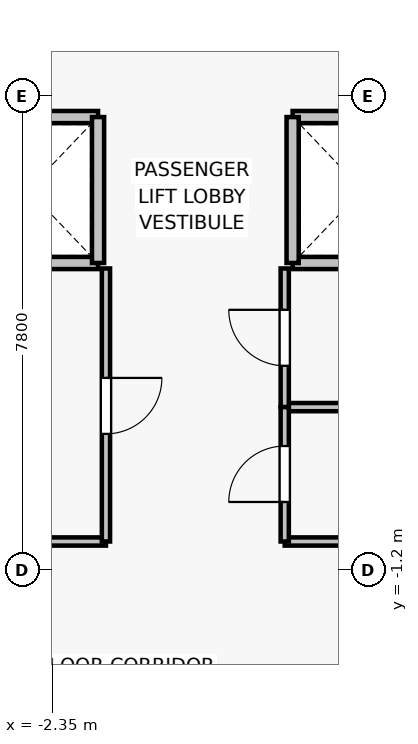
"""IFC4 building model, lengths in metres.
Left out: names, types, materials, properties, quantities, classifications, styles, units other than length and angle.
Written with IfcOpenShell. Run it as: python <this file> out.ifc"""

import sys

from ifc_helpers import new_model, si_unit, direction, frame, frame_2d, origin, place, context, subcontext, project, spatial, rectangle, extrude, source, transform, mapped, element, fill, save


model = new_model("IFC4")
c1 = context("Model", 3, precision=1e-05, world=origin(), true_north=direction((0.0, 1.0)))
c2 = subcontext(c1, "Body", "Model", "MODEL_VIEW")
j1 = project(units=[si_unit("LENGTHUNIT", "METRE"), si_unit("PLANEANGLEUNIT", "RADIAN")], contexts=[c1])
p1 = place(None, origin())
s1 = spatial("IfcSite", under=j1, at=p1, CompositionType="ELEMENT")
p2 = place(p1, origin())
s2 = spatial("IfcBuilding", under=s1, at=p2, CompositionType="ELEMENT")
p3 = place(p2, frame((0.0, 0.0, 73.6)))
s3 = spatial("IfcBuildingStorey", under=s2, at=p3, CompositionType="ELEMENT", Elevation=73.6)
for number, where, z_axis, x_axis in (
    (1, (-1.6, 3.85, 0.0), (0.0, 0.0, 1.0), (-1.0, 0.0, 0.0)),
    (2, (-3.9, 6.25, 0.0), (0.0, 0.0, 1.0), (1.0, 0.0, 0.0)),
):
    element("IfcWall", number, at=place(p3, frame(where, z_axis=z_axis, x_axis=x_axis)), inside=s3, PredefinedType="SOLIDWALL", context=c2, shape_type="SweptSolid", body=[
        extrude(rectangle(XDim=2.3, YDim=0.2, at=frame_2d((1.15, 0.0))), origin(), (0.0, 0.0, 1.0), 3.075),
    ])
p4 = place(p3, frame((-1.6, 6.25, 0.0), z_axis=(0.0, 0.0, 1.0), x_axis=(0.0, -1.0, 0.0)))
e3 = element("IfcWall", 3, at=p4, inside=s3, PredefinedType="SOLIDWALL", context=c2, shape_type="SweptSolid", body=[
    extrude(rectangle(XDim=2.4, YDim=0.2, at=frame_2d((1.2, 0.0))), origin(), (0.0, 0.0, 1.0), 3.075),
])
for number, where, z_axis, x_axis in (
    (4, (3.9, 3.85, 0.0), (0.0, 0.0, 1.0), (-1.0, 0.0, 0.0)),
    (5, (1.6, 6.25, 0.0), (0.0, 0.0, 1.0), (1.0, 0.0, 0.0)),
):
    element("IfcWall", number, at=place(p3, frame(where, z_axis=z_axis, x_axis=x_axis)), inside=s3, PredefinedType="SOLIDWALL", context=c2, shape_type="SweptSolid", body=[
        extrude(rectangle(XDim=2.3, YDim=0.2, at=frame_2d((1.15, 0.0))), origin(), (0.0, 0.0, 1.0), 3.075),
    ])
p5 = place(p3, frame((1.6, 3.85, 0.0), z_axis=(0.0, 0.0, 1.0), x_axis=(0.0, 1.0, 0.0)))
e6 = element("IfcWall", 6, at=p5, inside=s3, PredefinedType="SOLIDWALL", context=c2, shape_type="SweptSolid", body=[
    extrude(rectangle(XDim=2.4, YDim=0.2, at=frame_2d((1.2, 0.0))), origin(), (0.0, 0.0, 1.0), 3.075),
])
p6 = place(p3, frame((-1.47, -0.73, 0.0), z_axis=(0.0, 0.0, 1.0), x_axis=(-1.0, 0.0, 0.0)))
e7 = element("IfcWall", 7, at=p6, inside=s3, PredefinedType="PARTITIONING", context=c2, shape_type="SweptSolid", body=[
    extrude(rectangle(XDim=5.11, YDim=0.135, at=frame_2d((2.555, 0.0))), origin(), (0.0, 0.0, 1.0), 3.075),
])
p7 = place(p3, frame((-1.47, 3.76, 0.0), z_axis=(0.0, 0.0, 1.0), x_axis=(0.0, -1.0, 0.0)))
e8 = element("IfcWall", 8, at=p7, inside=s3, PredefinedType="PARTITIONING", context=c2, shape_type="SweptSolid", body=[
    extrude(rectangle(XDim=4.49, YDim=0.135, at=frame_2d((2.245, 0.0))), origin(), (0.0, 0.0, 1.0), 3.075),
])
p8 = place(p7, frame((1.8, 0.0, 0.0)))
e9 = element("IfcOpeningElement", 9, at=p8, cuts=e8, PredefinedType="OPENING", context=c2, shape_type="SweptSolid", body=[
    extrude(rectangle(XDim=0.92, YDim=2.1, at=frame_2d((0.46, 1.05))), frame((0.0, 0.077, 0.0), z_axis=(0.0, -1.0, 0.0), x_axis=(1.0, 0.0, 0.0)), (0.0, 0.0, 1.0), 0.155),
])
p9 = place(p3, frame((6.58, 1.48, 0.0), z_axis=(0.0, 0.0, 1.0), x_axis=(-1.0, 0.0, 0.0)))
e10 = element("IfcWall", 10, at=p9, inside=s3, PredefinedType="PARTITIONING", context=c2, shape_type="SweptSolid", body=[
    extrude(rectangle(XDim=5.11, YDim=0.135, at=frame_2d((2.555, 0.0))), origin(), (0.0, 0.0, 1.0), 3.075),
])
p10 = place(p3, frame((1.47, 1.48, 0.0), z_axis=(0.0, 0.0, 1.0), x_axis=(0.0, 1.0, 0.0)))
e11 = element("IfcWall", 11, at=p10, inside=s3, PredefinedType="PARTITIONING", context=c2, shape_type="SweptSolid", body=[
    extrude(rectangle(XDim=2.28, YDim=0.135, at=frame_2d((1.14, 0.0))), origin(), (0.0, 0.0, 1.0), 3.075),
])
p11 = place(p10, frame((0.68, 0.0, 0.0)))
e12 = element("IfcOpeningElement", 12, at=p11, cuts=e11, PredefinedType="OPENING", context=c2, shape_type="SweptSolid", body=[
    extrude(rectangle(XDim=0.92, YDim=2.1, at=frame_2d((0.46, 1.05))), frame((0.0, 0.077, 0.0), z_axis=(0.0, -1.0, 0.0), x_axis=(1.0, 0.0, 0.0)), (0.0, 0.0, 1.0), 0.155),
])
p12 = place(p3, frame((4.18, -0.73, 0.0), z_axis=(0.0, 0.0, 1.0), x_axis=(-1.0, 0.0, 0.0)))
e13 = element("IfcWall", 13, at=p12, inside=s3, PredefinedType="PARTITIONING", context=c2, shape_type="SweptSolid", body=[
    extrude(rectangle(XDim=2.71, YDim=0.135, at=frame_2d((1.355, 0.0))), origin(), (0.0, 0.0, 1.0), 3.075),
])
p13 = place(p3, frame((1.47, -0.73, 0.0), z_axis=(0.0, 0.0, 1.0), x_axis=(0.0, 1.0, 0.0)))
e14 = element("IfcWall", 14, at=p13, inside=s3, PredefinedType="PARTITIONING", context=c2, shape_type="SweptSolid", body=[
    extrude(rectangle(XDim=2.21, YDim=0.135, at=frame_2d((1.105, 0.0))), origin(), (0.0, 0.0, 1.0), 3.075),
])
p14 = place(p13, frame((0.65, 0.0, 0.0)))
e15 = element("IfcOpeningElement", 15, at=p14, cuts=e14, PredefinedType="OPENING", context=c2, shape_type="SweptSolid", body=[
    extrude(rectangle(XDim=0.92, YDim=2.1, at=frame_2d((0.46, 1.05))), frame((0.0, 0.077, 0.0), z_axis=(0.0, -1.0, 0.0), x_axis=(1.0, 0.0, 0.0)), (0.0, 0.0, 1.0), 0.155),
])
m1 = source(origin(), c2, "Body", "SweptSolid", [
    extrude(rectangle(XDim=0.92, YDim=2.1, at=frame_2d((0.46, 1.05))), frame((0.0, 0.025, 0.0), z_axis=(0.0, -1.0, 0.0), x_axis=(1.0, 0.0, 0.0)), (0.0, 0.0, 1.0), 0.05),
])
p15 = place(p8, origin())
e16 = element("IfcDoor", 16, at=p15, inside=s3, OperationType="SINGLE_SWING_LEFT", PredefinedType="DOOR", context=c2, shape_type="MappedRepresentation", body=[
    mapped(m1, transform((0.0, 0.0, 0.0), x_axis=(1.0, 0.0, 0.0), y_axis=(0.0, 1.0, 0.0), z_axis=(0.0, 0.0, 1.0), scale=1.0)),
])
fill(e9, e16)
p16 = place(p11, origin())
e17 = element("IfcDoor", 17, at=p16, inside=s3, OperationType="SINGLE_SWING_RIGHT", PredefinedType="DOOR", context=c2, shape_type="MappedRepresentation", body=[
    mapped(m1, transform((0.0, 0.0, 0.0), x_axis=(1.0, 0.0, 0.0), y_axis=(0.0, 1.0, 0.0), z_axis=(0.0, 0.0, 1.0), scale=1.0)),
])
fill(e12, e17)
p17 = place(p14, origin())
e18 = element("IfcDoor", 18, at=p17, inside=s3, OperationType="SINGLE_SWING_LEFT", PredefinedType="DOOR", context=c2, shape_type="MappedRepresentation", body=[
    mapped(m1, transform((0.0, 0.0, 0.0), x_axis=(1.0, 0.0, 0.0), y_axis=(0.0, 1.0, 0.0), z_axis=(0.0, 0.0, 1.0), scale=1.0)),
])
fill(e15, e18)
save(model, sys.argv[1])
